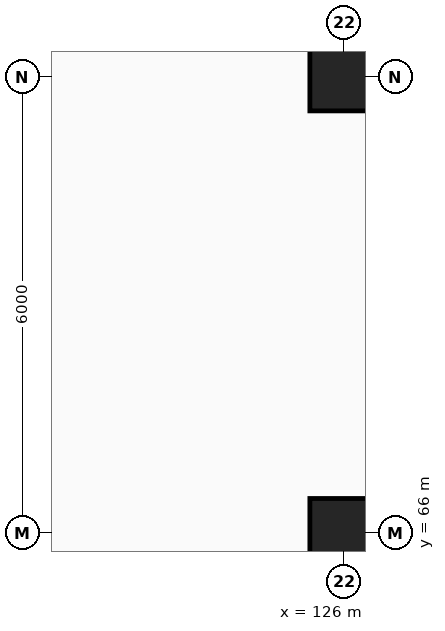
"""IFC4 building model, lengths in metres.
Left out: names, types, materials, properties, quantities, classifications, styles, units other than length and angle.
Written with IfcOpenShell. Run it as: python <this file> out.ifc"""

import sys

from ifc_helpers import new_model, si_unit, direction, frame, origin, origin_2d, place, context, subcontext, project, spatial, rectangle, extrude, element, save


model = new_model("IFC4")
c1 = context("Model", 3, precision=1e-05, world=origin(), true_north=direction((0.0, 1.0)))
c2 = subcontext(c1, "Body", "Model", "MODEL_VIEW")
j1 = project(units=[si_unit("LENGTHUNIT", "METRE"), si_unit("PLANEANGLEUNIT", "RADIAN")], contexts=[c1])
p1 = place(None, origin())
s1 = spatial("IfcSite", under=j1, at=p1, CompositionType="ELEMENT")
p2 = place(p1, origin())
s2 = spatial("IfcBuilding", under=s1, at=p2, CompositionType="ELEMENT")
p3 = place(p2, frame((0.0, 0.0, -4.8)))
s3 = spatial("IfcBuildingStorey", under=s2, at=p3, CompositionType="ELEMENT", Elevation=-4.8)
for number, where, z_axis, x_axis in (
    (1, (126.0, 66.0, 0.0), (0.0, 0.0, 1.0), (1.0, 0.0, 0.0)),
    (2, (126.0, 72.0, 0.0), (0.0, 0.0, 1.0), (1.0, 0.0, 0.0)),
):
    element("IfcColumn", number, at=place(p3, frame(where, z_axis=z_axis, x_axis=x_axis)), inside=s3, PredefinedType="COLUMN", context=c2, shape_type="SweptSolid", body=[
        extrude(rectangle(XDim=0.9, YDim=0.9, at=origin_2d()), origin(), (0.0, 0.0, 1.0), 4.8),
    ])
save(model, sys.argv[1])
